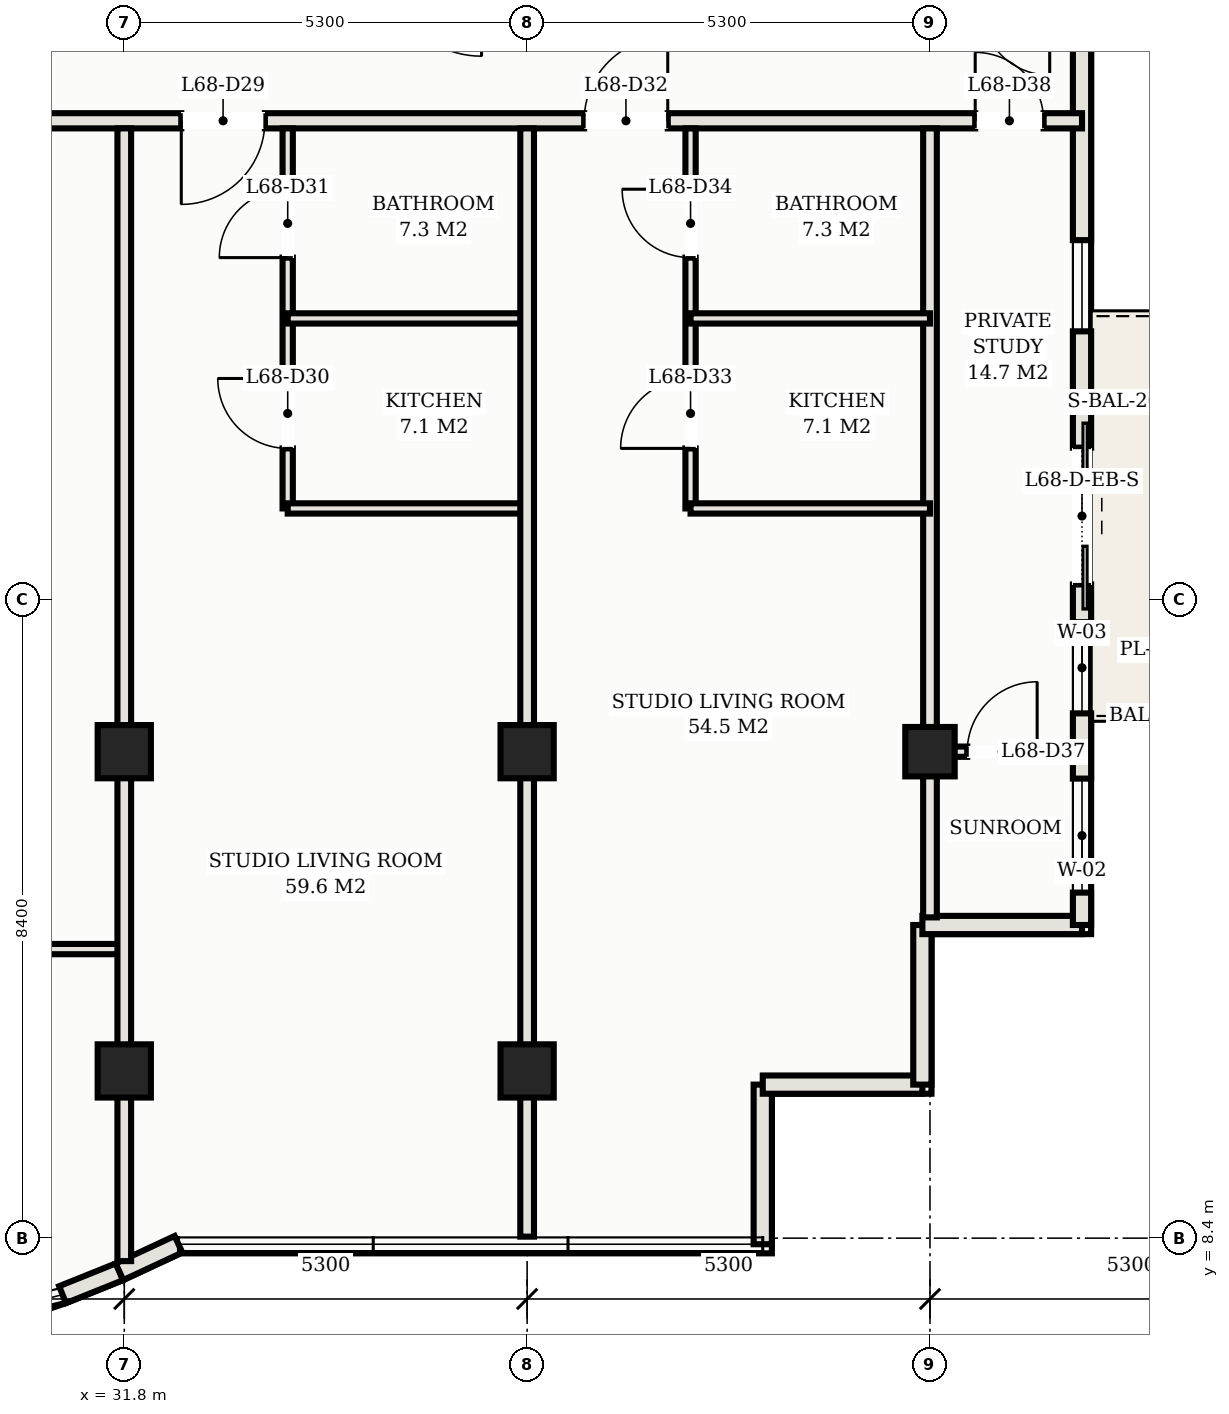
"""IFC4 building model, lengths in metres.
Left out: names, types, materials, properties, quantities, classifications, styles, units other than length and angle.
Written with IfcOpenShell. Run it as: python <this file> out.ifc"""

import sys

from ifc_helpers import new_model, si_unit, direction, frame, frame_2d, origin, origin_2d, place, context, subcontext, project, spatial, rectangle, hollow_rectangle, extrude, element, fill, save


model = new_model("IFC4")
c1 = context("Model", 3, precision=1e-05, world=origin(), true_north=direction((0.0, 1.0)))
c2 = subcontext(c1, "Body", "Model", "MODEL_VIEW")
j1 = project(units=[si_unit("LENGTHUNIT", "METRE"), si_unit("PLANEANGLEUNIT", "RADIAN")], contexts=[c1])
p1 = place(None, origin())
s1 = spatial("IfcSite", under=j1, at=p1, CompositionType="ELEMENT")
p2 = place(p1, origin())
s2 = spatial("IfcBuilding", under=s1, at=p2, CompositionType="ELEMENT")
p3 = place(p2, frame((0.0, 0.0, 246.2)))
s3 = spatial("IfcBuildingStorey", under=s2, at=p3, CompositionType="ELEMENT", Elevation=246.2)
for number, where, z_axis, x_axis in (
    (1, (31.8, 14.8, 0.0), (0.0, 0.0, 1.0), (1.0, 0.0, 0.0)),
    (2, (31.8, 10.6, 0.0), (0.0, 0.0, 1.0), (1.0, 0.0, 0.0)),
    (3, (37.1, 14.8, 0.0), (0.0, 0.0, 1.0), (1.0, 0.0, 0.0)),
    (4, (37.1, 10.6, 0.0), (0.0, 0.0, 1.0), (1.0, 0.0, 0.0)),
):
    element("IfcColumn", number, at=place(p3, frame(where, z_axis=z_axis, x_axis=x_axis)), inside=s3, PredefinedType="COLUMN", context=c2, shape_type="SweptSolid", body=[
        extrude(hollow_rectangle(XDim=0.7, YDim=0.7, WallThickness=0.025, at=origin_2d()), origin(), (0.0, 0.0, 1.0), 3.3),
    ])
p4 = place(p3, frame((42.4, 14.8, 0.0), z_axis=(0.0, 0.0, 1.0), x_axis=(1.0, 0.0, 0.0)))
e5 = element("IfcColumn", 5, at=p4, inside=s3, PredefinedType="COLUMN", context=c2, shape_type="SweptSolid", body=[
    extrude(hollow_rectangle(XDim=0.65, YDim=0.65, WallThickness=0.022, at=origin_2d()), origin(), (0.0, 0.0, 1.0), 3.3),
])
p5 = place(p3, frame((30.988, 7.657, 0.0), z_axis=(0.0, 0.0, 1.0), x_axis=(0.927870589467, 0.372902358805, 0.0)))
e6 = element("IfcWall", 6, at=p5, inside=s3, PredefinedType="SOLIDWALL", context=c2, shape_type="SweptSolid", body=[
    extrude(rectangle(XDim=0.807, YDim=0.24, at=frame_2d((0.404, 0.0))), origin(), (0.0, 0.0, 1.0), 3.11),
])
p6 = place(p3, frame((31.737, 7.958, 0.0), z_axis=(0.0, 0.0, 1.0), x_axis=(0.906190424584, 0.422869855147, 0.0)))
e7 = element("IfcWall", 7, at=p6, inside=s3, PredefinedType="SOLIDWALL", context=c2, shape_type="SweptSolid", body=[
    extrude(rectangle(XDim=0.856, YDim=0.24, at=frame_2d((0.428, 0.0))), origin(), (0.0, 0.0, 1.0), 3.11),
])
p7 = place(p3, frame((40.2, 8.32, 0.0), z_axis=(0.0, 0.0, 1.0), x_axis=(0.0, 1.0, 0.0)))
e8 = element("IfcWall", 8, at=p7, inside=s3, PredefinedType="SOLIDWALL", context=c2, shape_type="SweptSolid", body=[
    extrude(rectangle(XDim=2.1, YDim=0.24, at=frame_2d((1.05, 0.0))), origin(), (0.0, 0.0, 1.0), 3.11),
])
for number, where, z_axis, x_axis in (
    (9, (40.2, 10.42, 0.0), (0.0, 0.0, 1.0), (1.0, 0.0, 0.0)),
    (10, (42.3, 10.42, 0.0), (0.0, 0.0, 1.0), (0.0, 1.0, 0.0)),
):
    element("IfcWall", number, at=place(p3, frame(where, z_axis=z_axis, x_axis=x_axis)), inside=s3, PredefinedType="SOLIDWALL", context=c2, shape_type="SweptSolid", body=[
        extrude(rectangle(XDim=2.1, YDim=0.24, at=frame_2d((1.05, 0.0))), origin(), (0.0, 0.0, 1.0), 3.11),
    ])
p8 = place(p3, frame((42.3, 12.52, 0.0), z_axis=(0.0, 0.0, 1.0), x_axis=(1.0, 0.0, 0.0)))
e11 = element("IfcWall", 11, at=p8, inside=s3, PredefinedType="SOLIDWALL", context=c2, shape_type="SweptSolid", body=[
    extrude(rectangle(XDim=2.1, YDim=0.24, at=frame_2d((1.05, 0.0))), origin(), (0.0, 0.0, 1.0), 3.11),
])
p9 = place(p3, frame((44.4, 12.52, 0.0), z_axis=(0.0, 0.0, 1.0), x_axis=(0.0, 1.0, 0.0)))
e12 = element("IfcWall", 12, at=p9, inside=s3, PredefinedType="SOLIDWALL", context=c2, shape_type="SweptSolid", body=[
    extrude(rectangle(XDim=26.01, YDim=0.24, at=frame_2d((13.005, 0.0))), origin(), (0.0, 0.0, 1.0), 3.11),
])
p10 = place(p9, frame((4.48, 0.0, 0.0)))
e13 = element("IfcOpeningElement", 13, at=p10, cuts=e12, PredefinedType="OPENING", context=c2, shape_type="SweptSolid", body=[
    extrude(rectangle(XDim=1.8, YDim=2.2, at=frame_2d((0.9, 1.1))), frame((0.0, 0.13, 0.0), z_axis=(0.0, -1.0, 0.0), x_axis=(1.0, 0.0, 0.0)), (0.0, 0.0, 1.0), 0.26),
])
p11 = place(p9, frame((0.426, 0.0, 0.75)))
e14 = element("IfcOpeningElement", 14, at=p11, cuts=e12, PredefinedType="OPENING", context=c2, shape_type="SweptSolid", body=[
    extrude(rectangle(XDim=1.5, YDim=1.6, at=frame_2d((0.75, 0.8))), frame((0.0, 0.13, 0.0), z_axis=(0.0, -1.0, 0.0), x_axis=(1.0, 0.0, 0.0)), (0.0, 0.0, 1.0), 0.26),
])
p12 = place(p9, frame((2.784, 0.0, 0.75)))
e15 = element("IfcOpeningElement", 15, at=p12, cuts=e12, PredefinedType="OPENING", context=c2, shape_type="SweptSolid", body=[
    extrude(rectangle(XDim=1.2, YDim=1.5, at=frame_2d((0.6, 0.75))), frame((0.0, 0.13, 0.0), z_axis=(0.0, -1.0, 0.0), x_axis=(1.0, 0.0, 0.0)), (0.0, 0.0, 1.0), 0.26),
])
p13 = place(p9, frame((7.81, 0.0, 0.75)))
e16 = element("IfcOpeningElement", 16, at=p13, cuts=e12, PredefinedType="OPENING", context=c2, shape_type="SweptSolid", body=[
    extrude(rectangle(XDim=1.2, YDim=1.5, at=frame_2d((0.6, 0.75))), frame((0.0, 0.13, 0.0), z_axis=(0.0, -1.0, 0.0), x_axis=(1.0, 0.0, 0.0)), (0.0, 0.0, 1.0), 0.26),
])
p14 = place(p9, frame((18.425, 0.0, 0.75)))
e17 = element("IfcOpeningElement", 17, at=p14, cuts=e12, PredefinedType="OPENING", context=c2, shape_type="SweptSolid", body=[
    extrude(rectangle(XDim=1.2, YDim=1.5, at=frame_2d((0.6, 0.75))), frame((0.0, 0.13, 0.0), z_axis=(0.0, -1.0, 0.0), x_axis=(1.0, 0.0, 0.0)), (0.0, 0.0, 1.0), 0.26),
])
p15 = place(p3, frame((8.6, 23.1, 0.0), z_axis=(0.0, 0.0, 1.0), x_axis=(1.0, 0.0, 0.0)))
e18 = element("IfcWall", 18, at=p15, inside=s3, PredefinedType="PARTITIONING", context=c2, shape_type="SweptSolid", body=[
    extrude(rectangle(XDim=35.8, YDim=0.2, at=frame_2d((17.9, 0.0))), origin(), (0.0, 0.0, 1.0), 2.45),
])
p16 = place(p15, frame((2.75, 0.0, 0.0)))
e19 = element("IfcOpeningElement", 19, at=p16, cuts=e18, PredefinedType="OPENING", context=c2, shape_type="SweptSolid", body=[
    extrude(rectangle(XDim=1.1, YDim=2.25, at=frame_2d((0.55, 1.125))), frame((0.0, 0.11, 0.0), z_axis=(0.0, -1.0, 0.0), x_axis=(1.0, 0.0, 0.0)), (0.0, 0.0, 1.0), 0.22),
])
p17 = place(p15, frame((13.35, 0.0, 0.0)))
e20 = element("IfcOpeningElement", 20, at=p17, cuts=e18, PredefinedType="OPENING", context=c2, shape_type="SweptSolid", body=[
    extrude(rectangle(XDim=1.1, YDim=2.25, at=frame_2d((0.55, 1.125))), frame((0.0, 0.11, 0.0), z_axis=(0.0, -1.0, 0.0), x_axis=(1.0, 0.0, 0.0)), (0.0, 0.0, 1.0), 0.22),
])
p18 = place(p15, frame((23.95, 0.0, 0.0)))
e21 = element("IfcOpeningElement", 21, at=p18, cuts=e18, PredefinedType="OPENING", context=c2, shape_type="SweptSolid", body=[
    extrude(rectangle(XDim=1.1, YDim=2.25, at=frame_2d((0.55, 1.125))), frame((0.0, 0.11, 0.0), z_axis=(0.0, -1.0, 0.0), x_axis=(1.0, 0.0, 0.0)), (0.0, 0.0, 1.0), 0.22),
])
p19 = place(p15, frame((29.25, 0.0, 0.0)))
e22 = element("IfcOpeningElement", 22, at=p19, cuts=e18, PredefinedType="OPENING", context=c2, shape_type="SweptSolid", body=[
    extrude(rectangle(XDim=1.1, YDim=2.25, at=frame_2d((0.55, 1.125))), frame((0.0, 0.11, 0.0), z_axis=(0.0, -1.0, 0.0), x_axis=(1.0, 0.0, 0.0)), (0.0, 0.0, 1.0), 0.22),
])
p20 = place(p15, frame((0.505, 0.0, 0.0)))
e23 = element("IfcOpeningElement", 23, at=p20, cuts=e18, PredefinedType="OPENING", context=c2, shape_type="SweptSolid", body=[
    extrude(rectangle(XDim=0.9, YDim=2.15, at=frame_2d((0.45, 1.075))), frame((0.0, 0.11, 0.0), z_axis=(0.0, -1.0, 0.0), x_axis=(1.0, 0.0, 0.0)), (0.0, 0.0, 1.0), 0.22),
])
p21 = place(p15, frame((34.395, 0.0, 0.0)))
e24 = element("IfcOpeningElement", 24, at=p21, cuts=e18, PredefinedType="OPENING", context=c2, shape_type="SweptSolid", body=[
    extrude(rectangle(XDim=0.9, YDim=2.15, at=frame_2d((0.45, 1.075))), frame((0.0, 0.11, 0.0), z_axis=(0.0, -1.0, 0.0), x_axis=(1.0, 0.0, 0.0)), (0.0, 0.0, 1.0), 0.22),
])
p22 = place(p3, frame((42.4, 12.62, 0.0), z_axis=(0.0, 0.0, 1.0), x_axis=(0.0, 1.0, 0.0)))
e25 = element("IfcWall", 25, at=p22, inside=s3, PredefinedType="PARTITIONING", context=c2, shape_type="SweptSolid", body=[
    extrude(rectangle(XDim=10.38, YDim=0.18, at=frame_2d((5.19, 0.0))), origin(), (0.0, 0.0, 1.0), 2.45),
])
p23 = place(p3, frame((21.2, 12.203, 0.0), z_axis=(0.0, 0.0, 1.0), x_axis=(1.0, 0.0, 0.0)))
e26 = element("IfcWall", 26, at=p23, inside=s3, PredefinedType="PARTITIONING", context=c2, shape_type="SweptSolid", body=[
    extrude(rectangle(XDim=10.6, YDim=0.135, at=frame_2d((5.3, 0.0))), origin(), (0.0, 0.0, 1.0), 2.45),
])
p24 = place(p23, frame((0.615, 0.0, 0.0)))
e27 = element("IfcOpeningElement", 27, at=p24, cuts=e26, PredefinedType="OPENING", context=c2, shape_type="SweptSolid", body=[
    extrude(rectangle(XDim=0.92, YDim=2.15, at=frame_2d((0.46, 1.075))), frame((0.0, 0.078, 0.0), z_axis=(0.0, -1.0, 0.0), x_axis=(1.0, 0.0, 0.0)), (0.0, 0.0, 1.0), 0.155),
])
p25 = place(p3, frame((31.8, 8.098, 0.0), z_axis=(0.0, 0.0, 1.0), x_axis=(0.0, 1.0, 0.0)))
e28 = element("IfcWall", 28, at=p25, inside=s3, PredefinedType="PARTITIONING", context=c2, shape_type="SweptSolid", body=[
    extrude(rectangle(XDim=14.902, YDim=0.18, at=frame_2d((7.451, 0.0))), origin(), (0.0, 0.0, 1.0), 2.45),
])
p26 = place(p3, frame((33.95, 18.0, 0.0), z_axis=(0.0, 0.0, 1.0), x_axis=(0.0, 1.0, 0.0)))
e29 = element("IfcWall", 29, at=p26, inside=s3, PredefinedType="PARTITIONING", context=c2, shape_type="SweptSolid", body=[
    extrude(rectangle(XDim=5.0, YDim=0.135, at=frame_2d((2.5, 0.0))), origin(), (0.0, 0.0, 1.0), 2.45),
])
p27 = place(p26, frame((0.79, 0.0, 0.0)))
e30 = element("IfcOpeningElement", 30, at=p27, cuts=e29, PredefinedType="OPENING", context=c2, shape_type="SweptSolid", body=[
    extrude(rectangle(XDim=0.92, YDim=2.15, at=frame_2d((0.46, 1.075))), frame((0.0, 0.078, 0.0), z_axis=(0.0, -1.0, 0.0), x_axis=(1.0, 0.0, 0.0)), (0.0, 0.0, 1.0), 0.155),
])
p28 = place(p26, frame((3.3, 0.0, 0.0)))
e31 = element("IfcOpeningElement", 31, at=p28, cuts=e29, PredefinedType="OPENING", context=c2, shape_type="SweptSolid", body=[
    extrude(rectangle(XDim=0.9, YDim=2.15, at=frame_2d((0.45, 1.075))), frame((0.0, 0.078, 0.0), z_axis=(0.0, -1.0, 0.0), x_axis=(1.0, 0.0, 0.0)), (0.0, 0.0, 1.0), 0.155),
])
for number, where, z_axis, x_axis in (
    (32, (33.95, 18.0, 0.0), (0.0, 0.0, 1.0), (1.0, 0.0, 0.0)),
    (33, (33.95, 20.5, 0.0), (0.0, 0.0, 1.0), (1.0, 0.0, 0.0)),
):
    element("IfcWall", number, at=place(p3, frame(where, z_axis=z_axis, x_axis=x_axis)), inside=s3, PredefinedType="PARTITIONING", context=c2, shape_type="SweptSolid", body=[
        extrude(rectangle(XDim=3.15, YDim=0.135, at=frame_2d((1.575, 0.0))), origin(), (0.0, 0.0, 1.0), 2.45),
    ])
p29 = place(p3, frame((37.1, 8.42, 0.0), z_axis=(0.0, 0.0, 1.0), x_axis=(0.0, 1.0, 0.0)))
e34 = element("IfcWall", 34, at=p29, inside=s3, PredefinedType="PARTITIONING", context=c2, shape_type="SweptSolid", body=[
    extrude(rectangle(XDim=14.58, YDim=0.18, at=frame_2d((7.29, 0.0))), origin(), (0.0, 0.0, 1.0), 2.45),
])
p30 = place(p3, frame((39.25, 18.0, 0.0), z_axis=(0.0, 0.0, 1.0), x_axis=(0.0, 1.0, 0.0)))
e35 = element("IfcWall", 35, at=p30, inside=s3, PredefinedType="PARTITIONING", context=c2, shape_type="SweptSolid", body=[
    extrude(rectangle(XDim=5.0, YDim=0.135, at=frame_2d((2.5, 0.0))), origin(), (0.0, 0.0, 1.0), 2.45),
])
p31 = place(p30, frame((0.79, 0.0, 0.0)))
e36 = element("IfcOpeningElement", 36, at=p31, cuts=e35, PredefinedType="OPENING", context=c2, shape_type="SweptSolid", body=[
    extrude(rectangle(XDim=0.92, YDim=2.15, at=frame_2d((0.46, 1.075))), frame((0.0, 0.078, 0.0), z_axis=(0.0, -1.0, 0.0), x_axis=(1.0, 0.0, 0.0)), (0.0, 0.0, 1.0), 0.155),
])
p32 = place(p30, frame((3.3, 0.0, 0.0)))
e37 = element("IfcOpeningElement", 37, at=p32, cuts=e35, PredefinedType="OPENING", context=c2, shape_type="SweptSolid", body=[
    extrude(rectangle(XDim=0.9, YDim=2.15, at=frame_2d((0.45, 1.075))), frame((0.0, 0.078, 0.0), z_axis=(0.0, -1.0, 0.0), x_axis=(1.0, 0.0, 0.0)), (0.0, 0.0, 1.0), 0.155),
])
for number, where, z_axis, x_axis in (
    (38, (39.25, 18.0, 0.0), (0.0, 0.0, 1.0), (1.0, 0.0, 0.0)),
    (39, (39.25, 20.5, 0.0), (0.0, 0.0, 1.0), (1.0, 0.0, 0.0)),
):
    element("IfcWall", number, at=place(p3, frame(where, z_axis=z_axis, x_axis=x_axis)), inside=s3, PredefinedType="PARTITIONING", context=c2, shape_type="SweptSolid", body=[
        extrude(rectangle(XDim=3.15, YDim=0.135, at=frame_2d((1.575, 0.0))), origin(), (0.0, 0.0, 1.0), 2.45),
    ])
p33 = place(p3, frame((42.4, 14.8, 0.0), z_axis=(0.0, 0.0, 1.0), x_axis=(1.0, 0.0, 0.0)))
e40 = element("IfcWall", 40, at=p33, inside=s3, PredefinedType="PARTITIONING", context=c2, shape_type="SweptSolid", body=[
    extrude(rectangle(XDim=1.9, YDim=0.135, at=frame_2d((0.95, 0.0))), origin(), (0.0, 0.0, 1.0), 2.45),
])
p34 = place(p33, frame((0.49, 0.0, 0.0)))
e41 = element("IfcOpeningElement", 41, at=p34, cuts=e40, PredefinedType="OPENING", context=c2, shape_type="SweptSolid", body=[
    extrude(rectangle(XDim=0.92, YDim=2.15, at=frame_2d((0.46, 1.075))), frame((0.0, 0.078, 0.0), z_axis=(0.0, -1.0, 0.0), x_axis=(1.0, 0.0, 0.0)), (0.0, 0.0, 1.0), 0.155),
])
p35 = place(p10, frame((1.8, 0.0, 0.0), z_axis=(0.0, 0.0, 1.0), x_axis=(-1.0, 0.0, 0.0)))
e42 = element("IfcDoor", 42, at=p35, inside=s3, OperationType="DOUBLE_DOOR_SLIDING", PredefinedType="DOOR", context=c2, shape_type="SweptSolid", body=[
    extrude(rectangle(XDim=1.8, YDim=2.2, at=frame_2d((0.9, 1.1))), frame((0.0, 0.025, 0.0), z_axis=(0.0, -1.0, 0.0), x_axis=(1.0, 0.0, 0.0)), (0.0, 0.0, 1.0), 0.05),
])
fill(e13, e42)
p36 = place(p11, origin())
e43 = element("IfcWindow", 43, at=p36, inside=s3, PartitioningType="SINGLE_PANEL", PredefinedType="WINDOW", context=c2, shape_type="SweptSolid", body=[
    extrude(rectangle(XDim=1.5, YDim=1.6, at=frame_2d((0.75, 0.8))), frame((0.0, 0.03, 0.0), z_axis=(0.0, -1.0, 0.0), x_axis=(1.0, 0.0, 0.0)), (0.0, 0.0, 1.0), 0.06),
])
fill(e14, e43)
p37 = place(p18, frame((1.1, 0.0, 0.0), z_axis=(0.0, 0.0, 1.0), x_axis=(-1.0, 0.0, 0.0)))
e44 = element("IfcDoor", 44, at=p37, inside=s3, OperationType="SINGLE_SWING_RIGHT", PredefinedType="DOOR", context=c2, shape_type="SweptSolid", body=[
    extrude(rectangle(XDim=1.1, YDim=2.25, at=frame_2d((0.55, 1.125))), frame((0.0, 0.025, 0.0), z_axis=(0.0, -1.0, 0.0), x_axis=(1.0, 0.0, 0.0)), (0.0, 0.0, 1.0), 0.05),
])
fill(e21, e44)
p38 = place(p27, origin())
e45 = element("IfcDoor", 45, at=p38, inside=s3, OperationType="SINGLE_SWING_RIGHT", PredefinedType="DOOR", context=c2, shape_type="SweptSolid", body=[
    extrude(rectangle(XDim=0.92, YDim=2.15, at=frame_2d((0.46, 1.075))), frame((0.0, 0.025, 0.0), z_axis=(0.0, -1.0, 0.0), x_axis=(1.0, 0.0, 0.0)), (0.0, 0.0, 1.0), 0.05),
])
fill(e30, e45)
p39 = place(p28, origin())
e46 = element("IfcDoor", 46, at=p39, inside=s3, OperationType="SINGLE_SWING_LEFT", PredefinedType="DOOR", context=c2, shape_type="SweptSolid", body=[
    extrude(rectangle(XDim=0.9, YDim=2.15, at=frame_2d((0.45, 1.075))), frame((0.0, 0.025, 0.0), z_axis=(0.0, -1.0, 0.0), x_axis=(1.0, 0.0, 0.0)), (0.0, 0.0, 1.0), 0.05),
])
fill(e31, e46)
p40 = place(p19, origin())
e47 = element("IfcDoor", 47, at=p40, inside=s3, OperationType="SINGLE_SWING_RIGHT", PredefinedType="DOOR", context=c2, shape_type="SweptSolid", body=[
    extrude(rectangle(XDim=1.1, YDim=2.25, at=frame_2d((0.55, 1.125))), frame((0.0, 0.025, 0.0), z_axis=(0.0, -1.0, 0.0), x_axis=(1.0, 0.0, 0.0)), (0.0, 0.0, 1.0), 0.05),
])
fill(e22, e47)
p41 = place(p31, origin())
e48 = element("IfcDoor", 48, at=p41, inside=s3, OperationType="SINGLE_SWING_LEFT", PredefinedType="DOOR", context=c2, shape_type="SweptSolid", body=[
    extrude(rectangle(XDim=0.92, YDim=2.15, at=frame_2d((0.46, 1.075))), frame((0.0, 0.025, 0.0), z_axis=(0.0, -1.0, 0.0), x_axis=(1.0, 0.0, 0.0)), (0.0, 0.0, 1.0), 0.05),
])
fill(e36, e48)
p42 = place(p32, origin())
e49 = element("IfcDoor", 49, at=p42, inside=s3, OperationType="SINGLE_SWING_RIGHT", PredefinedType="DOOR", context=c2, shape_type="SweptSolid", body=[
    extrude(rectangle(XDim=0.9, YDim=2.15, at=frame_2d((0.45, 1.075))), frame((0.0, 0.025, 0.0), z_axis=(0.0, -1.0, 0.0), x_axis=(1.0, 0.0, 0.0)), (0.0, 0.0, 1.0), 0.05),
])
fill(e37, e49)
p43 = place(p34, origin())
e50 = element("IfcDoor", 50, at=p43, inside=s3, OperationType="SINGLE_SWING_RIGHT", PredefinedType="DOOR", context=c2, shape_type="SweptSolid", body=[
    extrude(rectangle(XDim=0.92, YDim=2.15, at=frame_2d((0.46, 1.075))), frame((0.0, 0.025, 0.0), z_axis=(0.0, -1.0, 0.0), x_axis=(1.0, 0.0, 0.0)), (0.0, 0.0, 1.0), 0.05),
])
fill(e41, e50)
p44 = place(p21, origin())
e51 = element("IfcDoor", 51, at=p44, inside=s3, OperationType="SINGLE_SWING_LEFT", PredefinedType="DOOR", context=c2, shape_type="SweptSolid", body=[
    extrude(rectangle(XDim=0.9, YDim=2.15, at=frame_2d((0.45, 1.075))), frame((0.0, 0.025, 0.0), z_axis=(0.0, -1.0, 0.0), x_axis=(1.0, 0.0, 0.0)), (0.0, 0.0, 1.0), 0.05),
])
fill(e24, e51)
p45 = place(p12, origin())
e52 = element("IfcWindow", 52, at=p45, inside=s3, PartitioningType="SINGLE_PANEL", PredefinedType="WINDOW", context=c2, shape_type="SweptSolid", body=[
    extrude(rectangle(XDim=1.2, YDim=1.5, at=frame_2d((0.6, 0.75))), frame((0.0, 0.03, 0.0), z_axis=(0.0, -1.0, 0.0), x_axis=(1.0, 0.0, 0.0)), (0.0, 0.0, 1.0), 0.06),
])
fill(e15, e52)
p46 = place(p13, origin())
e53 = element("IfcWindow", 53, at=p46, inside=s3, PartitioningType="SINGLE_PANEL", PredefinedType="WINDOW", context=c2, shape_type="SweptSolid", body=[
    extrude(rectangle(XDim=1.2, YDim=1.5, at=frame_2d((0.6, 0.75))), frame((0.0, 0.03, 0.0), z_axis=(0.0, -1.0, 0.0), x_axis=(1.0, 0.0, 0.0)), (0.0, 0.0, 1.0), 0.06),
])
fill(e16, e53)
save(model, sys.argv[1])
